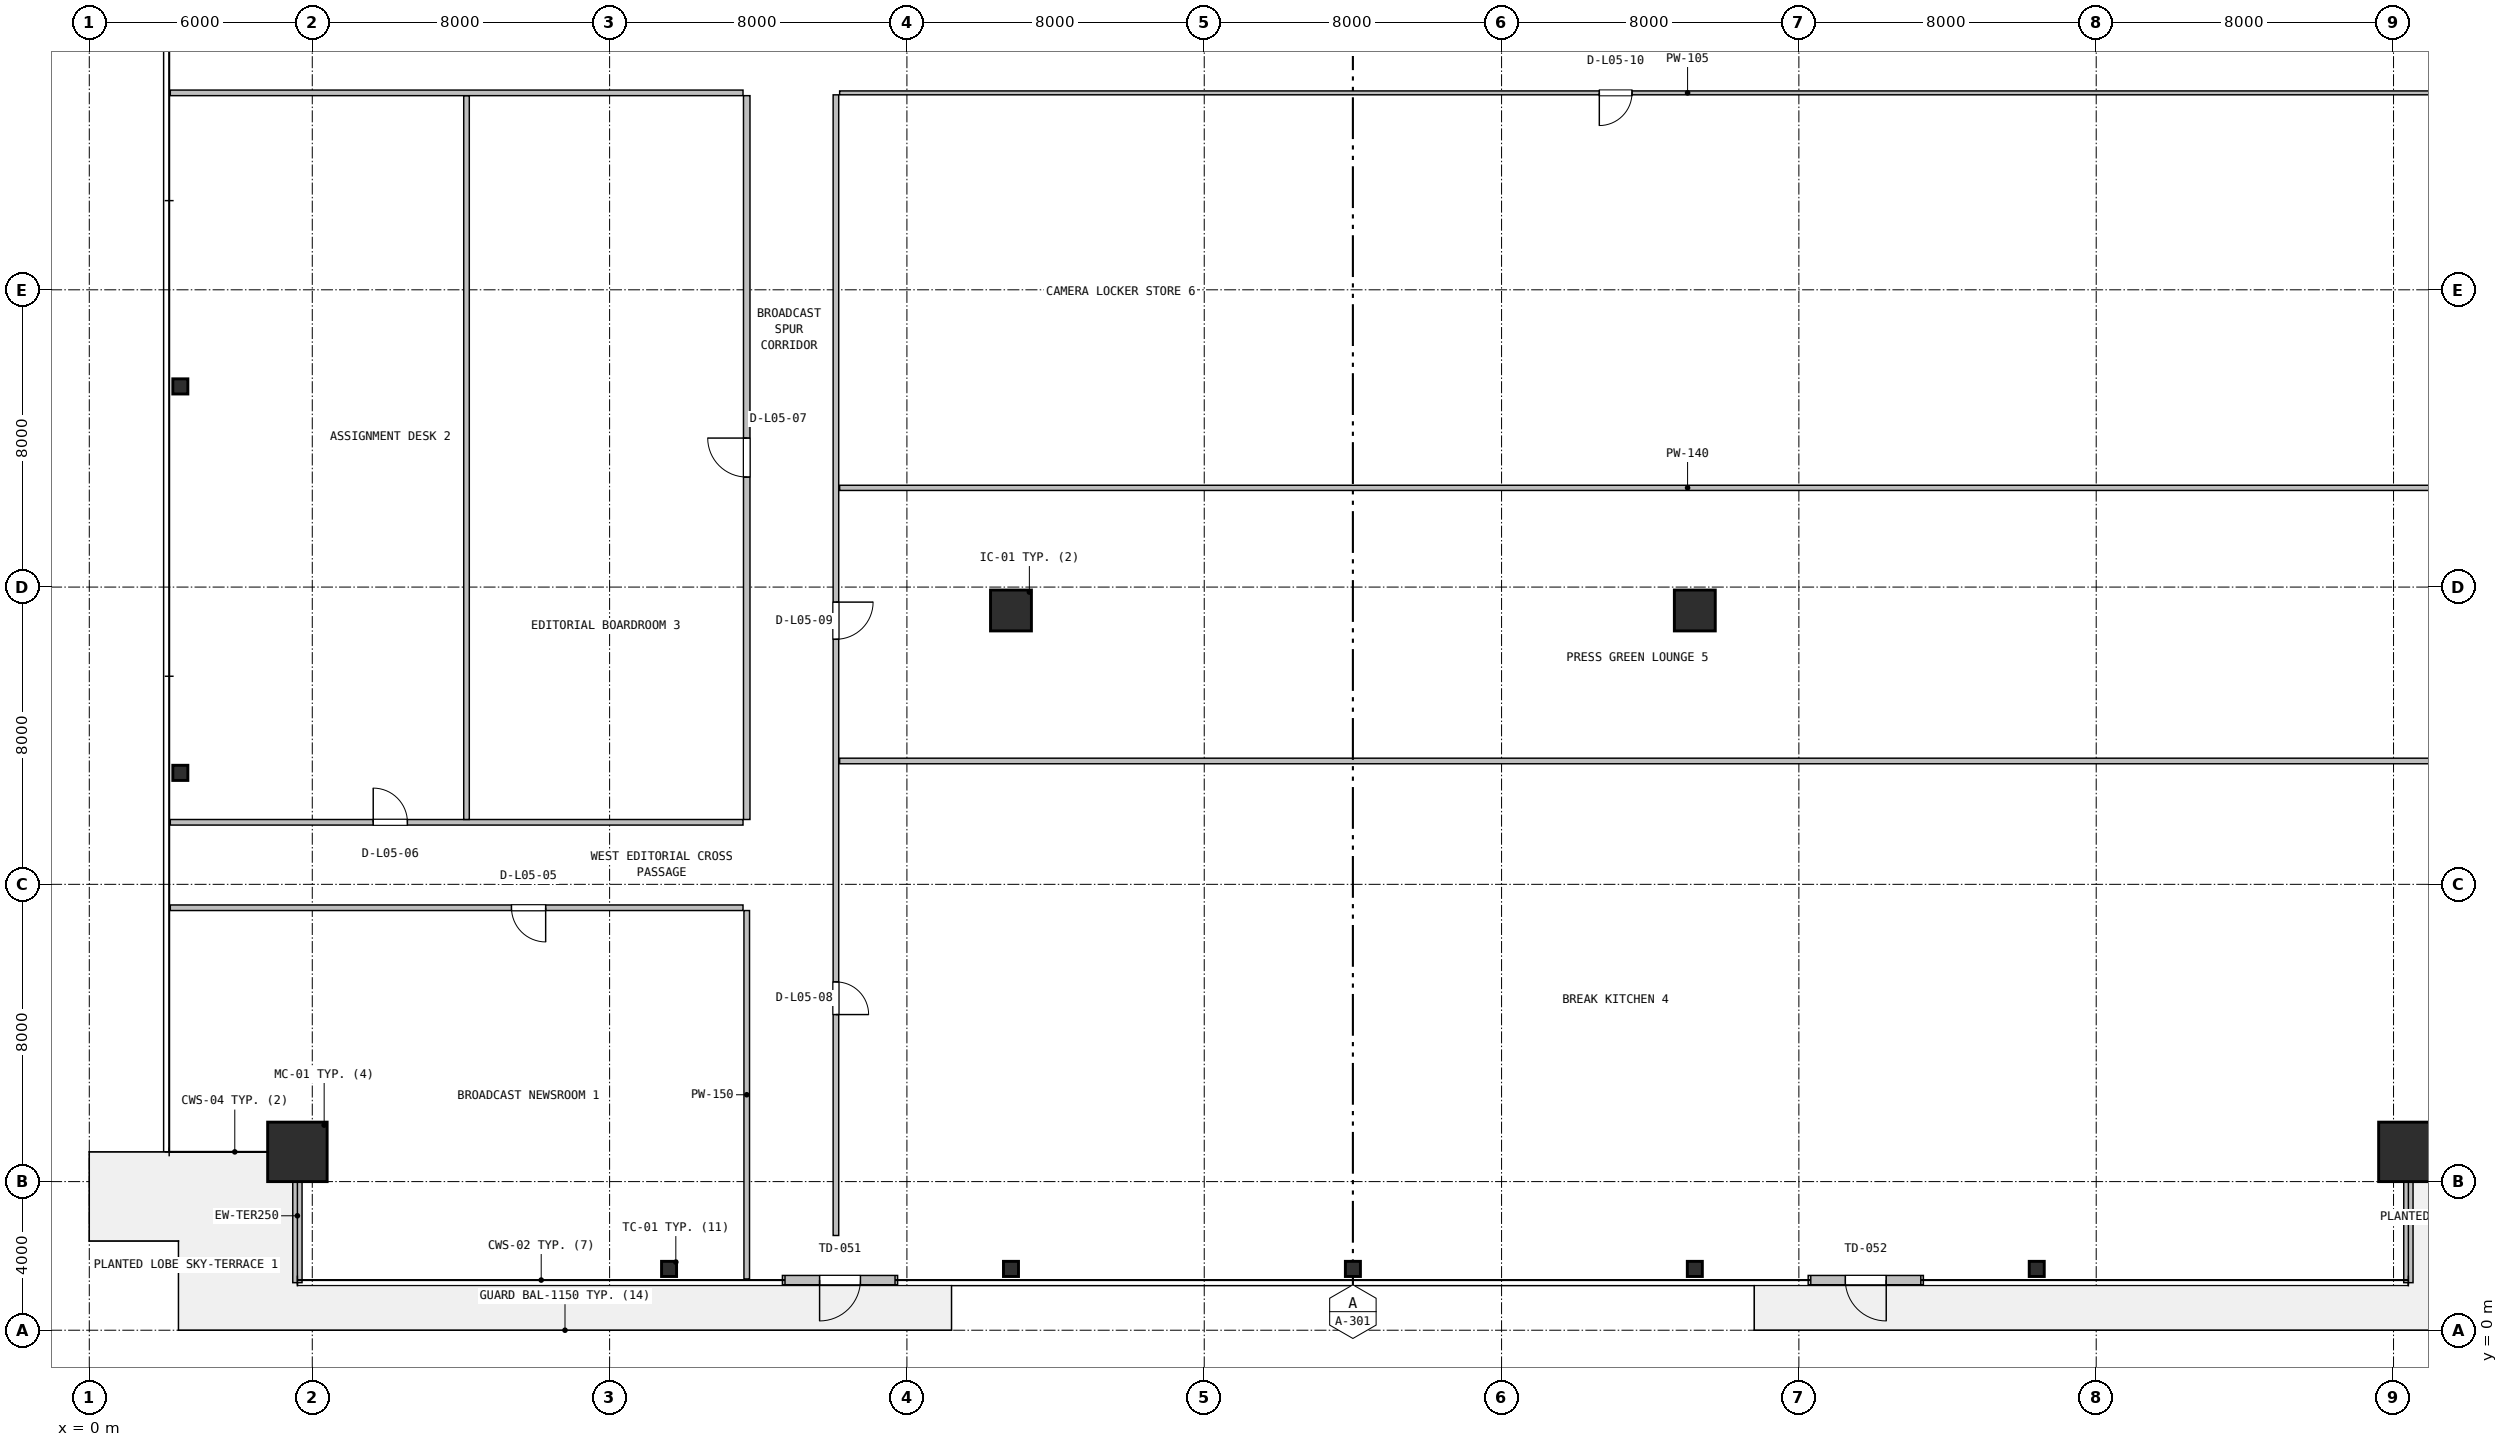
"""IFC4 building model, lengths in metres.
Left out: names, types, materials, properties, quantities, classifications, styles, units other than length and angle.
Written with IfcOpenShell. Run it as: python <this file> out.ifc"""

import sys

from ifc_helpers import new_model, si_unit, direction, frame, frame_2d, origin, origin_2d, place, context, subcontext, project, spatial, rectangle, hollow_rectangle, i_section, extrude, source, transform, mapped, element, fill, save


model = new_model("IFC4")
c1 = context("Model", 3, precision=1e-05, world=origin(), true_north=direction((0.0, 1.0)))
c2 = subcontext(c1, "Body", "Model", "MODEL_VIEW")
j1 = project(units=[si_unit("LENGTHUNIT", "METRE"), si_unit("PLANEANGLEUNIT", "RADIAN")], contexts=[c1])
p1 = place(None, origin())
s1 = spatial("IfcSite", under=j1, at=p1, CompositionType="ELEMENT")
p2 = place(p1, origin())
s2 = spatial("IfcBuilding", under=s1, at=p2, CompositionType="ELEMENT")
p3 = place(p2, frame((0.0, 0.0, 27.6)))
s3 = spatial("IfcBuildingStorey", under=s2, at=p3, CompositionType="ELEMENT", Elevation=27.6)
m1 = source(origin(), c2, "Body", "SweptSolid", [
    extrude(hollow_rectangle(XDim=1.6, YDim=1.6, WallThickness=0.06, at=origin_2d()), origin(), (0.0, 0.0, 1.0), 3.9),
])
for number, where, z_axis, x_axis in (
    (1, (5.6, 4.8, 0.0), (0.0, 0.0, 1.0), (1.0, 0.0, 0.0)),
    (2, (62.4, 4.8, 0.0), (0.0, 0.0, 1.0), (1.0, 0.0, 0.0)),
):
    element("IfcColumn", number, at=place(p3, frame(where, z_axis=z_axis, x_axis=x_axis)), inside=s3, PredefinedType="COLUMN", context=c2, shape_type="MappedRepresentation", body=[
        mapped(m1, transform((0.0, 0.0, 0.0), x_axis=(1.0, 0.0, 0.0), y_axis=(0.0, 1.0, 0.0), z_axis=(0.0, 0.0, 1.0), scale=1.0)),
    ])
m2 = source(origin(), c2, "Body", "SweptSolid", [
    extrude(i_section(OverallWidth=0.404, OverallDepth=0.407, WebThickness=0.027, FlangeThickness=0.044, FilletRadius=0.018, at=origin_2d()), origin(), (0.0, 0.0, 1.0), 3.9),
])
for number, where, z_axis, x_axis in (
    (3, (15.6, 1.65, 0.0), (0.0, 0.0, 1.0), (1.0, 0.0, 0.0)),
    (4, (24.8, 1.65, 0.0), (0.0, 0.0, 1.0), (1.0, 0.0, 0.0)),
    (5, (34.0, 1.65, 0.0), (0.0, 0.0, 1.0), (1.0, 0.0, 0.0)),
    (6, (43.2, 1.65, 0.0), (0.0, 0.0, 1.0), (1.0, 0.0, 0.0)),
    (7, (52.4, 1.65, 0.0), (0.0, 0.0, 1.0), (1.0, 0.0, 0.0)),
    (8, (2.45, 15.0, 0.0), (0.0, 0.0, 1.0), (1.0, 0.0, 0.0)),
    (9, (2.45, 25.4, 0.0), (0.0, 0.0, 1.0), (1.0, 0.0, 0.0)),
):
    element("IfcColumn", number, at=place(p3, frame(where, z_axis=z_axis, x_axis=x_axis)), inside=s3, PredefinedType="COLUMN", context=c2, shape_type="MappedRepresentation", body=[
        mapped(m2, transform((0.0, 0.0, 0.0), x_axis=(1.0, 0.0, 0.0), y_axis=(0.0, 1.0, 0.0), z_axis=(0.0, 0.0, 1.0), scale=1.0)),
    ])
m3 = source(origin(), c2, "Body", "SweptSolid", [
    extrude(rectangle(XDim=1.1, YDim=1.1, at=origin_2d()), origin(), (0.0, 0.0, 1.0), 3.9),
])
for number, where, z_axis, x_axis in (
    (10, (24.8, 19.37, 0.0), (0.0, 0.0, 1.0), (1.0, 0.0, 0.0)),
    (11, (43.2, 19.37, 0.0), (0.0, 0.0, 1.0), (1.0, 0.0, 0.0)),
):
    element("IfcColumn", number, at=place(p3, frame(where, z_axis=z_axis, x_axis=x_axis)), inside=s3, PredefinedType="COLUMN", context=c2, shape_type="MappedRepresentation", body=[
        mapped(m3, transform((0.0, 0.0, 0.0), x_axis=(1.0, 0.0, 0.0), y_axis=(0.0, 1.0, 0.0), z_axis=(0.0, 0.0, 1.0), scale=1.0)),
    ])
p4 = place(p3, frame((18.65, 1.35, 0.0), z_axis=(0.0, 0.0, 1.0), x_axis=(1.0, 0.0, 0.0)))
e12 = element("IfcWall", 12, at=p4, inside=s3, PredefinedType="SOLIDWALL", context=c2, shape_type="SweptSolid", body=[
    extrude(rectangle(XDim=3.1, YDim=0.25, at=frame_2d((1.55, 0.0))), origin(), (0.0, 0.0, 1.0), 3.63),
])
p5 = place(p4, frame((1.0, 0.0, 0.0)))
e13 = element("IfcOpeningElement", 13, at=p5, cuts=e12, PredefinedType="OPENING", context=c2, shape_type="SweptSolid", body=[
    extrude(rectangle(XDim=1.1, YDim=2.15, at=frame_2d((0.55, 1.075))), frame((0.0, 0.135, 0.0), z_axis=(0.0, -1.0, 0.0), x_axis=(1.0, 0.0, 0.0)), (0.0, 0.0, 1.0), 0.27),
])
p6 = place(p3, frame((46.25, 1.35, 0.0), z_axis=(0.0, 0.0, 1.0), x_axis=(1.0, 0.0, 0.0)))
e14 = element("IfcWall", 14, at=p6, inside=s3, PredefinedType="SOLIDWALL", context=c2, shape_type="SweptSolid", body=[
    extrude(rectangle(XDim=3.1, YDim=0.25, at=frame_2d((1.55, 0.0))), origin(), (0.0, 0.0, 1.0), 3.63),
])
p7 = place(p6, frame((1.0, 0.0, 0.0)))
e15 = element("IfcOpeningElement", 15, at=p7, cuts=e14, PredefinedType="OPENING", context=c2, shape_type="SweptSolid", body=[
    extrude(rectangle(XDim=1.1, YDim=2.15, at=frame_2d((0.55, 1.075))), frame((0.0, 0.135, 0.0), z_axis=(0.0, -1.0, 0.0), x_axis=(1.0, 0.0, 0.0)), (0.0, 0.0, 1.0), 0.27),
])
for number, where, z_axis, x_axis in (
    (16, (5.6, 1.28, 0.0), (0.0, 0.0, 1.0), (0.0, 1.0, 0.0)),
    (17, (62.4, 1.28, 0.0), (0.0, 0.0, 1.0), (0.0, 1.0, 0.0)),
):
    element("IfcWall", number, at=place(p3, frame(where, z_axis=z_axis, x_axis=x_axis)), inside=s3, PredefinedType="SOLIDWALL", context=c2, shape_type="SweptSolid", body=[
        extrude(rectangle(XDim=3.6, YDim=0.25, at=frame_2d((1.8, 0.0))), origin(), (0.0, 0.0, 1.0), 3.208),
    ])
p8 = place(p3, frame((17.69, 1.38, 0.0), z_axis=(0.0, 0.0, 1.0), x_axis=(0.0, 1.0, 0.0)))
e18 = element("IfcWall", 18, at=p8, inside=s3, PredefinedType="PARTITIONING", context=c2, shape_type="SweptSolid", body=[
    extrude(rectangle(XDim=9.915, YDim=0.15, at=frame_2d((4.958, 0.0))), origin(), (0.0, 0.0, 1.0), 3.208),
])
p9 = place(p3, frame((2.18, 11.37, 0.0), z_axis=(0.0, 0.0, 1.0), x_axis=(1.0, 0.0, 0.0)))
e19 = element("IfcWall", 19, at=p9, inside=s3, PredefinedType="PARTITIONING", context=c2, shape_type="SweptSolid", body=[
    extrude(rectangle(XDim=15.41, YDim=0.15, at=frame_2d((7.705, 0.0))), origin(), (0.0, 0.0, 1.0), 3.208),
])
p10 = place(p9, frame((9.18, 0.0, 0.0)))
e20 = element("IfcOpeningElement", 20, at=p10, cuts=e19, PredefinedType="OPENING", context=c2, shape_type="SweptSolid", body=[
    extrude(rectangle(XDim=0.92, YDim=2.08, at=frame_2d((0.46, 1.04))), frame((0.0, 0.085, 0.0), z_axis=(0.0, -1.0, 0.0), x_axis=(1.0, 0.0, 0.0)), (0.0, 0.0, 1.0), 0.17),
])
p11 = place(p3, frame((2.18, 13.67, 0.0), z_axis=(0.0, 0.0, 1.0), x_axis=(1.0, 0.0, 0.0)))
e21 = element("IfcWall", 21, at=p11, inside=s3, PredefinedType="PARTITIONING", context=c2, shape_type="SweptSolid", body=[
    extrude(rectangle(XDim=15.41, YDim=0.15, at=frame_2d((7.705, 0.0))), origin(), (0.0, 0.0, 1.0), 3.208),
])
p12 = place(p11, frame((5.46, 0.0, 0.0)))
e22 = element("IfcOpeningElement", 22, at=p12, cuts=e21, PredefinedType="OPENING", context=c2, shape_type="SweptSolid", body=[
    extrude(rectangle(XDim=0.92, YDim=2.08, at=frame_2d((0.46, 1.04))), frame((0.0, 0.085, 0.0), z_axis=(0.0, -1.0, 0.0), x_axis=(1.0, 0.0, 0.0)), (0.0, 0.0, 1.0), 0.17),
])
p13 = place(p3, frame((10.15, 13.745, 0.0), z_axis=(0.0, 0.0, 1.0), x_axis=(0.0, 1.0, 0.0)))
e23 = element("IfcWall", 23, at=p13, inside=s3, PredefinedType="PARTITIONING", context=c2, shape_type="SweptSolid", body=[
    extrude(rectangle(XDim=19.48, YDim=0.15, at=frame_2d((9.74, 0.0))), origin(), (0.0, 0.0, 1.0), 3.322),
])
p14 = place(p3, frame((2.18, 33.3, 0.0), z_axis=(0.0, 0.0, 1.0), x_axis=(1.0, 0.0, 0.0)))
e24 = element("IfcWall", 24, at=p14, inside=s3, PredefinedType="PARTITIONING", context=c2, shape_type="SweptSolid", body=[
    extrude(rectangle(XDim=15.41, YDim=0.15, at=frame_2d((7.705, 0.0))), origin(), (0.0, 0.0, 1.0), 3.208),
])
p15 = place(p3, frame((17.69, 13.745, 0.0), z_axis=(0.0, 0.0, 1.0), x_axis=(0.0, 1.0, 0.0)))
e25 = element("IfcWall", 25, at=p15, inside=s3, PredefinedType="PARTITIONING", context=c2, shape_type="SweptSolid", body=[
    extrude(rectangle(XDim=19.48, YDim=0.175, at=frame_2d((9.74, 0.0))), origin(), (0.0, 0.0, 1.0), 3.322),
])
p16 = place(p15, frame((9.215, 0.0, 0.0)))
e26 = element("IfcOpeningElement", 26, at=p16, cuts=e25, PredefinedType="OPENING", context=c2, shape_type="SweptSolid", body=[
    extrude(rectangle(XDim=1.05, YDim=2.1, at=frame_2d((0.525, 1.05))), frame((0.0, 0.098, 0.0), z_axis=(0.0, -1.0, 0.0), x_axis=(1.0, 0.0, 0.0)), (0.0, 0.0, 1.0), 0.195),
])
p17 = place(p3, frame((20.19, 15.32, 0.0), z_axis=(0.0, 0.0, 1.0), x_axis=(1.0, 0.0, 0.0)))
e27 = element("IfcWall", 27, at=p17, inside=s3, PredefinedType="PARTITIONING", context=c2, shape_type="SweptSolid", body=[
    extrude(rectangle(XDim=45.63, YDim=0.15, at=frame_2d((22.815, 0.0))), origin(), (0.0, 0.0, 1.0), 2.852),
])
p18 = place(p3, frame((20.09, 2.55, 0.0), z_axis=(0.0, 0.0, 1.0), x_axis=(0.0, 1.0, 0.0)))
e28 = element("IfcWall", 28, at=p18, inside=s3, PredefinedType="PARTITIONING", context=c2, shape_type="SweptSolid", body=[
    extrude(rectangle(XDim=30.697, YDim=0.15, at=frame_2d((15.349, 0.0))), origin(), (0.0, 0.0, 1.0), 3.322),
])
p19 = place(p18, frame((5.945, 0.0, 0.0)))
e29 = element("IfcOpeningElement", 29, at=p19, cuts=e28, PredefinedType="OPENING", context=c2, shape_type="SweptSolid", body=[
    extrude(rectangle(XDim=0.88, YDim=2.06, at=frame_2d((0.44, 1.03))), frame((0.0, 0.085, 0.0), z_axis=(0.0, -1.0, 0.0), x_axis=(1.0, 0.0, 0.0)), (0.0, 0.0, 1.0), 0.17),
])
p20 = place(p18, frame((16.045, 0.0, 0.0)))
e30 = element("IfcOpeningElement", 30, at=p20, cuts=e28, PredefinedType="OPENING", context=c2, shape_type="SweptSolid", body=[
    extrude(rectangle(XDim=1.0, YDim=2.1, at=frame_2d((0.5, 1.05))), frame((0.0, 0.085, 0.0), z_axis=(0.0, -1.0, 0.0), x_axis=(1.0, 0.0, 0.0)), (0.0, 0.0, 1.0), 0.17),
])
p21 = place(p3, frame((20.19, 22.67, 0.0), z_axis=(0.0, 0.0, 1.0), x_axis=(1.0, 0.0, 0.0)))
e31 = element("IfcWall", 31, at=p21, inside=s3, PredefinedType="PARTITIONING", context=c2, shape_type="SweptSolid", body=[
    extrude(rectangle(XDim=45.63, YDim=0.14, at=frame_2d((22.815, 0.0))), origin(), (0.0, 0.0, 1.0), 2.852),
])
p22 = place(p3, frame((20.19, 33.3, 0.0), z_axis=(0.0, 0.0, 1.0), x_axis=(1.0, 0.0, 0.0)))
e32 = element("IfcWall", 32, at=p22, inside=s3, PredefinedType="PARTITIONING", context=c2, shape_type="SweptSolid", body=[
    extrude(rectangle(XDim=45.63, YDim=0.105, at=frame_2d((22.815, 0.0))), origin(), (0.0, 0.0, 1.0), 2.852),
])
p23 = place(p22, frame((20.44, 0.0, 0.0)))
e33 = element("IfcOpeningElement", 33, at=p23, cuts=e32, PredefinedType="OPENING", context=c2, shape_type="SweptSolid", body=[
    extrude(rectangle(XDim=0.88, YDim=2.06, at=frame_2d((0.44, 1.03))), frame((0.0, 0.062, 0.0), z_axis=(0.0, -1.0, 0.0), x_axis=(1.0, 0.0, 0.0)), (0.0, 0.0, 1.0), 0.125),
])
m4 = source(origin(), c2, "Body", "SweptSolid", [
    extrude(rectangle(XDim=1.1, YDim=2.15, at=frame_2d((0.55, 1.075))), frame((0.0, 0.025, 0.0), z_axis=(0.0, -1.0, 0.0), x_axis=(1.0, 0.0, 0.0)), (0.0, 0.0, 1.0), 0.05),
])
p24 = place(p5, frame((1.1, 0.0, 0.0), z_axis=(0.0, 0.0, 1.0), x_axis=(-1.0, 0.0, 0.0)))
e34 = element("IfcDoor", 34, at=p24, inside=s3, OperationType="SINGLE_SWING_LEFT", PredefinedType="DOOR", context=c2, shape_type="MappedRepresentation", body=[
    mapped(m4, transform((0.0, 0.0, 0.0), x_axis=(1.0, 0.0, 0.0), y_axis=(0.0, 1.0, 0.0), z_axis=(0.0, 0.0, 1.0), scale=1.0)),
])
fill(e13, e34)
p25 = place(p7, frame((1.1, 0.0, 0.0), z_axis=(0.0, 0.0, 1.0), x_axis=(-1.0, 0.0, 0.0)))
e35 = element("IfcDoor", 35, at=p25, inside=s3, OperationType="SINGLE_SWING_RIGHT", PredefinedType="DOOR", context=c2, shape_type="MappedRepresentation", body=[
    mapped(m4, transform((0.0, 0.0, 0.0), x_axis=(1.0, 0.0, 0.0), y_axis=(0.0, 1.0, 0.0), z_axis=(0.0, 0.0, 1.0), scale=1.0)),
])
fill(e15, e35)
m5 = source(origin(), c2, "Body", "SweptSolid", [
    extrude(rectangle(XDim=0.92, YDim=2.08, at=frame_2d((0.46, 1.04))), frame((0.0, 0.025, 0.0), z_axis=(0.0, -1.0, 0.0), x_axis=(1.0, 0.0, 0.0)), (0.0, 0.0, 1.0), 0.05),
])
p26 = place(p10, frame((0.92, 0.0, 0.0), z_axis=(0.0, 0.0, 1.0), x_axis=(-1.0, 0.0, 0.0)))
e36 = element("IfcDoor", 36, at=p26, inside=s3, OperationType="SINGLE_SWING_RIGHT", PredefinedType="DOOR", context=c2, shape_type="MappedRepresentation", body=[
    mapped(m5, transform((0.0, 0.0, 0.0), x_axis=(1.0, 0.0, 0.0), y_axis=(0.0, 1.0, 0.0), z_axis=(0.0, 0.0, 1.0), scale=1.0)),
])
fill(e20, e36)
p27 = place(p12, origin())
e37 = element("IfcDoor", 37, at=p27, inside=s3, OperationType="SINGLE_SWING_LEFT", PredefinedType="DOOR", context=c2, shape_type="MappedRepresentation", body=[
    mapped(m5, transform((0.0, 0.0, 0.0), x_axis=(1.0, 0.0, 0.0), y_axis=(0.0, 1.0, 0.0), z_axis=(0.0, 0.0, 1.0), scale=1.0)),
])
fill(e22, e37)
m6 = source(origin(), c2, "Body", "SweptSolid", [
    extrude(rectangle(XDim=1.05, YDim=2.1, at=frame_2d((0.525, 1.05))), frame((0.0, 0.025, 0.0), z_axis=(0.0, -1.0, 0.0), x_axis=(1.0, 0.0, 0.0)), (0.0, 0.0, 1.0), 0.05),
])
p28 = place(p16, origin())
e38 = element("IfcDoor", 38, at=p28, inside=s3, OperationType="SINGLE_SWING_RIGHT", PredefinedType="DOOR", context=c2, shape_type="MappedRepresentation", body=[
    mapped(m6, transform((0.0, 0.0, 0.0), x_axis=(1.0, 0.0, 0.0), y_axis=(0.0, 1.0, 0.0), z_axis=(0.0, 0.0, 1.0), scale=1.0)),
])
fill(e26, e38)
m7 = source(origin(), c2, "Body", "SweptSolid", [
    extrude(rectangle(XDim=0.88, YDim=2.06, at=frame_2d((0.44, 1.03))), frame((0.0, 0.025, 0.0), z_axis=(0.0, -1.0, 0.0), x_axis=(1.0, 0.0, 0.0)), (0.0, 0.0, 1.0), 0.05),
])
p29 = place(p19, frame((0.88, 0.0, 0.0), z_axis=(0.0, 0.0, 1.0), x_axis=(-1.0, 0.0, 0.0)))
e39 = element("IfcDoor", 39, at=p29, inside=s3, OperationType="SINGLE_SWING_LEFT", PredefinedType="DOOR", context=c2, shape_type="MappedRepresentation", body=[
    mapped(m7, transform((0.0, 0.0, 0.0), x_axis=(1.0, 0.0, 0.0), y_axis=(0.0, 1.0, 0.0), z_axis=(0.0, 0.0, 1.0), scale=1.0)),
])
fill(e29, e39)
m8 = source(origin(), c2, "Body", "SweptSolid", [
    extrude(rectangle(XDim=1.0, YDim=2.1, at=frame_2d((0.5, 1.05))), frame((0.0, 0.025, 0.0), z_axis=(0.0, -1.0, 0.0), x_axis=(1.0, 0.0, 0.0)), (0.0, 0.0, 1.0), 0.05),
])
p30 = place(p20, frame((1.0, 0.0, 0.0), z_axis=(0.0, 0.0, 1.0), x_axis=(-1.0, 0.0, 0.0)))
e40 = element("IfcDoor", 40, at=p30, inside=s3, OperationType="SINGLE_SWING_RIGHT", PredefinedType="DOOR", context=c2, shape_type="MappedRepresentation", body=[
    mapped(m8, transform((0.0, 0.0, 0.0), x_axis=(1.0, 0.0, 0.0), y_axis=(0.0, 1.0, 0.0), z_axis=(0.0, 0.0, 1.0), scale=1.0)),
])
fill(e30, e40)
p31 = place(p23, frame((0.88, 0.0, 0.0), z_axis=(0.0, 0.0, 1.0), x_axis=(-1.0, 0.0, 0.0)))
e41 = element("IfcDoor", 41, at=p31, inside=s3, OperationType="SINGLE_SWING_LEFT", PredefinedType="DOOR", context=c2, shape_type="MappedRepresentation", body=[
    mapped(m7, transform((0.0, 0.0, 0.0), x_axis=(1.0, 0.0, 0.0), y_axis=(0.0, 1.0, 0.0), z_axis=(0.0, 0.0, 1.0), scale=1.0)),
])
fill(e33, e41)
save(model, sys.argv[1])
